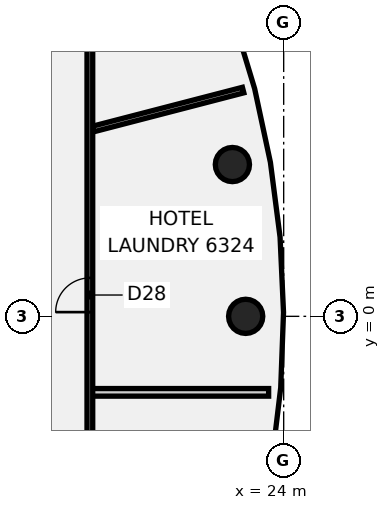
"""IFC4 building model, lengths in metres.
Left out: names, types, materials, properties, quantities, classifications, styles, units other than length and angle.
Written with IfcOpenShell. Run it as: python <this file> out.ifc"""

import sys

from ifc_helpers import new_model, si_unit, direction, frame, frame_2d, origin, origin_2d, place, context, subcontext, project, spatial, rectangle, circle, extrude, element, fill, save


model = new_model("IFC4")
c1 = context("Model", 3, precision=1e-05, world=origin(), true_north=direction((0.0, 1.0)))
c2 = subcontext(c1, "Body", "Model", "MODEL_VIEW")
j1 = project(units=[si_unit("LENGTHUNIT", "METRE"), si_unit("PLANEANGLEUNIT", "RADIAN")], contexts=[c1])
p1 = place(None, origin())
s1 = spatial("IfcSite", under=j1, at=p1, CompositionType="ELEMENT")
p2 = place(p1, origin())
s2 = spatial("IfcBuilding", under=s1, at=p2, CompositionType="ELEMENT")
p3 = place(p2, frame((0.0, 0.0, 248.7)))
s3 = spatial("IfcBuildingStorey", under=s2, at=p3, CompositionType="ELEMENT", Elevation=248.7)
for number, where, z_axis, x_axis in (
    (1, (23.0, 0.0, -0.14), (0.0, 0.0, 1.0), (1.0, 0.0, 0.0)),
    (2, (22.651, 3.994, -0.14), (0.0, 0.0, 1.0), (1.0, 0.0, 0.0)),
):
    element("IfcColumn", number, at=place(p3, frame(where, z_axis=z_axis, x_axis=x_axis)), inside=s3, PredefinedType="COLUMN", context=c2, shape_type="SweptSolid", body=[
        extrude(circle(Radius=0.45, at=origin_2d()), origin(), (0.0, 0.0, 1.0), 3.56),
    ])
p4 = place(p3, frame((18.955, -2.0, 0.0), z_axis=(0.0, 0.0, 1.0), x_axis=(1.0, 0.0, 0.0)))
e3 = element("IfcWall", 3, at=p4, inside=s3, PredefinedType="PARTITIONING", context=c2, shape_type="SweptSolid", body=[
    extrude(rectangle(XDim=4.649, YDim=0.2, at=frame_2d((2.325, 0.0))), origin(), (0.0, 0.0, 1.0), 2.824),
])
p5 = place(p3, frame((18.977, 4.927, 0.0), z_axis=(0.0, 0.0, 1.0), x_axis=(0.967931825744, 0.251213018594, 0.0)))
e4 = element("IfcWall", 4, at=p5, inside=s3, PredefinedType="PARTITIONING", context=c2, shape_type="SweptSolid", body=[
    extrude(rectangle(XDim=4.087, YDim=0.15, at=frame_2d((2.043, 0.0))), origin(), (0.0, 0.0, 1.0), 2.824),
])
p6 = place(p3, frame((18.9, -10.1, 0.0), z_axis=(0.0, 0.0, 1.0), x_axis=(0.0, 1.0, 0.0)))
e5 = element("IfcWall", 5, at=p6, inside=s3, PredefinedType="PARTITIONING", context=c2, shape_type="SweptSolid", body=[
    extrude(rectangle(XDim=20.2, YDim=0.15, at=frame_2d((10.1, 0.0))), origin(), (0.0, 0.0, 1.0), 2.824),
])
p7 = place(p6, frame((4.8, 0.0, 0.0)))
e6 = element("IfcOpeningElement", 6, at=p7, cuts=e5, PredefinedType="OPENING", context=c2, shape_type="SweptSolid", body=[
    extrude(rectangle(XDim=0.9, YDim=2.1, at=frame_2d((0.45, 1.05))), frame((0.0, 0.085, 0.0), z_axis=(0.0, -1.0, 0.0), x_axis=(1.0, 0.0, 0.0)), (0.0, 0.0, 1.0), 0.17),
])
p8 = place(p6, frame((10.211, 0.0, 0.0)))
e7 = element("IfcOpeningElement", 7, at=p8, cuts=e5, PredefinedType="OPENING", context=c2, shape_type="SweptSolid", body=[
    extrude(rectangle(XDim=0.9, YDim=2.1, at=frame_2d((0.45, 1.05))), frame((0.0, 0.085, 0.0), z_axis=(0.0, -1.0, 0.0), x_axis=(1.0, 0.0, 0.0)), (0.0, 0.0, 1.0), 0.17),
])
p9 = place(p8, frame((0.9, 0.0, 0.0), z_axis=(0.0, 0.0, 1.0), x_axis=(-1.0, 0.0, 0.0)))
e8 = element("IfcDoor", 8, at=p9, inside=s3, OperationType="SINGLE_SWING_RIGHT", PredefinedType="DOOR", context=c2, shape_type="SweptSolid", body=[
    extrude(rectangle(XDim=0.9, YDim=2.1, at=frame_2d((0.45, 1.05))), frame((0.0, 0.025, 0.0), z_axis=(0.0, -1.0, 0.0), x_axis=(1.0, 0.0, 0.0)), (0.0, 0.0, 1.0), 0.05),
])
fill(e7, e8)
save(model, sys.argv[1])
